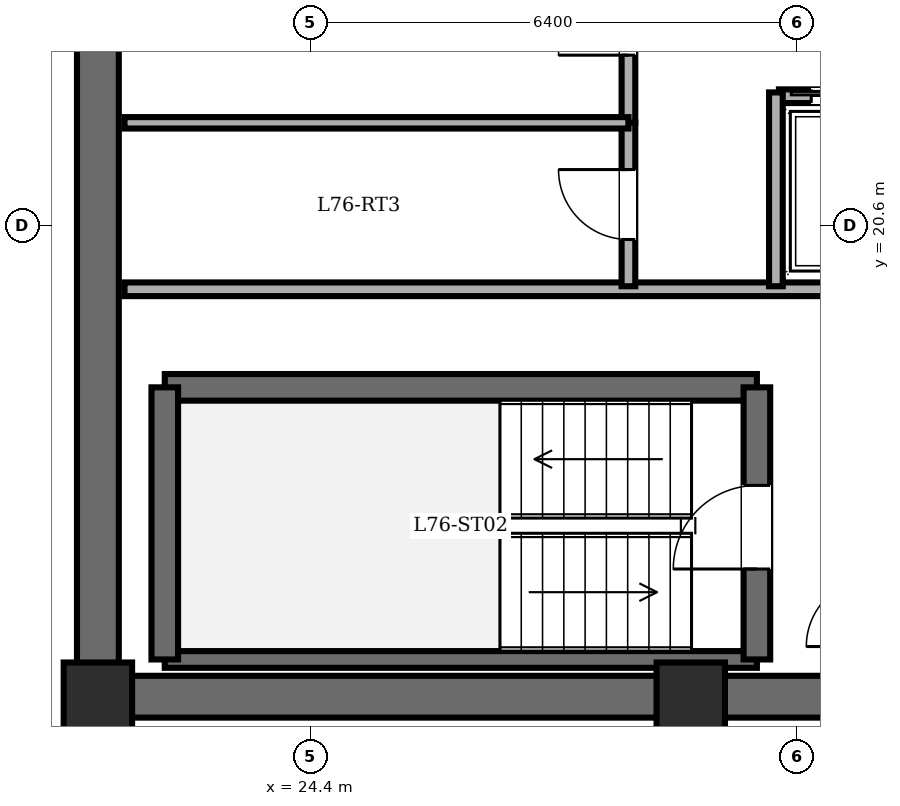
"""IFC4 building model, lengths in metres.
Left out: names, types, materials, properties, quantities, classifications, styles, units other than length and angle.
Written with IfcOpenShell. Run it as: python <this file> out.ifc"""

import sys

from ifc_helpers import new_model, si_unit, direction, frame, frame_2d, origin, origin_2d, place, context, subcontext, project, spatial, rectangle, extrude, element, fill, save


model = new_model("IFC4")
c1 = context("Model", 3, precision=1e-05, world=origin(), true_north=direction((0.0, 1.0)))
c2 = subcontext(c1, "Body", "Model", "MODEL_VIEW")
j1 = project(units=[si_unit("LENGTHUNIT", "METRE"), si_unit("PLANEANGLEUNIT", "RADIAN")], contexts=[c1])
p1 = place(None, origin())
s1 = spatial("IfcSite", under=j1, at=p1, CompositionType="ELEMENT")
p2 = place(p1, origin())
s2 = spatial("IfcBuilding", under=s1, at=p2, CompositionType="ELEMENT")
p3 = place(p2, frame((0.0, 0.0, 291.65)))
s3 = spatial("IfcBuildingStorey", under=s2, at=p3, CompositionType="ELEMENT", Elevation=291.65)
for number, where, z_axis, x_axis in (
    (1, (21.6, 14.4, 0.0), (0.0, 0.0, 1.0), (1.0, 0.0, 0.0)),
    (2, (29.4, 14.4, 0.0), (0.0, 0.0, 1.0), (1.0, 0.0, 0.0)),
):
    element("IfcColumn", number, at=place(p3, frame(where, z_axis=z_axis, x_axis=x_axis)), inside=s3, PredefinedType="COLUMN", context=c2, shape_type="SweptSolid", body=[
        extrude(rectangle(XDim=0.9, YDim=0.9, at=origin_2d()), origin(), (0.0, 0.0, 1.0), 3.65),
    ])
p4 = place(p3, frame((21.6, 14.4, 0.0), z_axis=(0.0, 0.0, 1.0), x_axis=(0.0, 1.0, 0.0)))
e3 = element("IfcWall", 3, at=p4, inside=s3, PredefinedType="SHEAR", context=c2, shape_type="SweptSolid", body=[
    extrude(rectangle(XDim=19.2, YDim=0.55, at=frame_2d((9.6, 0.0))), origin(), (0.0, 0.0, 1.0), 3.41),
])
p5 = place(p3, frame((37.2, 14.4, 0.0), z_axis=(0.0, 0.0, 1.0), x_axis=(-1.0, 0.0, 0.0)))
e4 = element("IfcWall", 4, at=p5, inside=s3, PredefinedType="SHEAR", context=c2, shape_type="SweptSolid", body=[
    extrude(rectangle(XDim=15.6, YDim=0.55, at=frame_2d((7.8, 0.0))), origin(), (0.0, 0.0, 1.0), 3.41),
])
p6 = place(p3, frame((22.48, 18.47, 0.0), z_axis=(0.0, 0.0, 1.0), x_axis=(1.0, 0.0, 0.0)))
e5 = element("IfcWall", 5, at=p6, inside=s3, PredefinedType="SOLIDWALL", context=c2, shape_type="SweptSolid", body=[
    extrude(rectangle(XDim=7.79, YDim=0.35, at=frame_2d((3.895, 0.0))), origin(), (0.0, 0.0, 1.0), 3.41),
])
p7 = place(p3, frame((22.48, 14.89, 0.0), z_axis=(0.0, 0.0, 1.0), x_axis=(1.0, 0.0, 0.0)))
e6 = element("IfcWall", 6, at=p7, inside=s3, PredefinedType="PARTITIONING", context=c2, shape_type="SweptSolid", body=[
    extrude(rectangle(XDim=7.79, YDim=0.22, at=frame_2d((3.895, 0.0))), origin(), (0.0, 0.0, 1.0), 3.41),
])
p8 = place(p3, frame((22.48, 14.89, 0.0), z_axis=(0.0, 0.0, 1.0), x_axis=(0.0, 1.0, 0.0)))
e7 = element("IfcWall", 7, at=p8, inside=s3, PredefinedType="SOLIDWALL", context=c2, shape_type="SweptSolid", body=[
    extrude(rectangle(XDim=3.58, YDim=0.35, at=frame_2d((1.79, 0.0))), origin(), (0.0, 0.0, 1.0), 3.41),
])
p9 = place(p3, frame((30.27, 14.89, 0.0), z_axis=(0.0, 0.0, 1.0), x_axis=(0.0, 1.0, 0.0)))
e8 = element("IfcWall", 8, at=p9, inside=s3, PredefinedType="SOLIDWALL", context=c2, shape_type="SweptSolid", body=[
    extrude(rectangle(XDim=3.58, YDim=0.35, at=frame_2d((1.79, 0.0))), origin(), (0.0, 0.0, 1.0), 3.41),
])
p10 = place(p9, frame((1.19, 0.0, 0.0)))
e9 = element("IfcOpeningElement", 9, at=p10, cuts=e8, PredefinedType="OPENING", context=c2, shape_type="SweptSolid", body=[
    extrude(rectangle(XDim=1.1, YDim=2.15, at=frame_2d((0.55, 1.075))), frame((0.0, 0.185, 0.0), z_axis=(0.0, -1.0, 0.0), x_axis=(1.0, 0.0, 0.0)), (0.0, 0.0, 1.0), 0.37),
])
p11 = place(p3, frame((21.95, 19.76, 0.0), z_axis=(0.0, 0.0, 1.0), x_axis=(1.0, 0.0, 0.0)))
e10 = element("IfcWall", 10, at=p11, inside=s3, PredefinedType="PARTITIONING", context=c2, shape_type="SweptSolid", body=[
    extrude(rectangle(XDim=14.87, YDim=0.18, at=frame_2d((7.435, 0.0))), origin(), (0.0, 0.0, 1.0), 3.41),
])
p12 = place(p3, frame((30.56, 22.3, 0.0), z_axis=(0.0, 0.0, 1.0), x_axis=(1.0, 0.0, 0.0)))
e11 = element("IfcWall", 11, at=p12, inside=s3, PredefinedType="PARTITIONING", context=c2, shape_type="SweptSolid", body=[
    extrude(rectangle(XDim=1.9, YDim=0.18, at=frame_2d((0.95, 0.0))), origin(), (0.0, 0.0, 1.0), 3.41),
])
p13 = place(p12, frame((0.425, 0.0, 0.0)))
e12 = element("IfcOpeningElement", 12, at=p13, cuts=e11, PredefinedType="OPENING", context=c2, shape_type="SweptSolid", body=[
    extrude(rectangle(XDim=1.05, YDim=2.2, at=frame_2d((0.525, 1.1))), frame((0.0, 0.1, 0.0), z_axis=(0.0, -1.0, 0.0), x_axis=(1.0, 0.0, 0.0)), (0.0, 0.0, 1.0), 0.2),
])
p14 = place(p3, frame((30.52, 19.8, 0.0), z_axis=(0.0, 0.0, 1.0), x_axis=(0.0, 1.0, 0.0)))
e13 = element("IfcWall", 13, at=p14, inside=s3, PredefinedType="PARTITIONING", context=c2, shape_type="SweptSolid", body=[
    extrude(rectangle(XDim=2.55, YDim=0.18, at=frame_2d((1.275, 0.0))), origin(), (0.0, 0.0, 1.0), 3.41),
])
p15 = place(p3, frame((28.58, 21.95, 0.0), z_axis=(0.0, 0.0, 1.0), x_axis=(0.0, 1.0, 0.0)))
e14 = element("IfcWall", 14, at=p15, inside=s3, PredefinedType="PARTITIONING", context=c2, shape_type="SweptSolid", body=[
    extrude(rectangle(XDim=2.7, YDim=0.18, at=frame_2d((1.35, 0.0))), origin(), (0.0, 0.0, 1.0), 3.41),
])
p16 = place(p15, frame((0.89, 0.0, 0.0)))
e15 = element("IfcOpeningElement", 15, at=p16, cuts=e14, PredefinedType="OPENING", context=c2, shape_type="SweptSolid", body=[
    extrude(rectangle(XDim=0.92, YDim=2.1, at=frame_2d((0.46, 1.05))), frame((0.0, 0.1, 0.0), z_axis=(0.0, -1.0, 0.0), x_axis=(1.0, 0.0, 0.0)), (0.0, 0.0, 1.0), 0.2),
])
p17 = place(p3, frame((28.58, 19.8, 0.0), z_axis=(0.0, 0.0, 1.0), x_axis=(0.0, 1.0, 0.0)))
e16 = element("IfcWall", 16, at=p17, inside=s3, PredefinedType="PARTITIONING", context=c2, shape_type="SweptSolid", body=[
    extrude(rectangle(XDim=2.15, YDim=0.18, at=frame_2d((1.075, 0.0))), origin(), (0.0, 0.0, 1.0), 3.41),
])
p18 = place(p17, frame((0.615, 0.0, 0.0)))
e17 = element("IfcOpeningElement", 17, at=p18, cuts=e16, PredefinedType="OPENING", context=c2, shape_type="SweptSolid", body=[
    extrude(rectangle(XDim=0.92, YDim=2.1, at=frame_2d((0.46, 1.05))), frame((0.0, 0.1, 0.0), z_axis=(0.0, -1.0, 0.0), x_axis=(1.0, 0.0, 0.0)), (0.0, 0.0, 1.0), 0.2),
])
p19 = place(p3, frame((21.95, 21.95, 0.0), z_axis=(0.0, 0.0, 1.0), x_axis=(1.0, 0.0, 0.0)))
e18 = element("IfcWall", 18, at=p19, inside=s3, PredefinedType="PARTITIONING", context=c2, shape_type="SweptSolid", body=[
    extrude(rectangle(XDim=6.63, YDim=0.15, at=frame_2d((3.315, 0.0))), origin(), (0.0, 0.0, 1.0), 3.41),
])
p20 = place(p10, origin())
e19 = element("IfcDoor", 19, at=p20, inside=s3, OperationType="SINGLE_SWING_LEFT", PredefinedType="DOOR", context=c2, shape_type="SweptSolid", body=[
    extrude(rectangle(XDim=1.1, YDim=2.15, at=frame_2d((0.55, 1.075))), frame((0.0, 0.025, 0.0), z_axis=(0.0, -1.0, 0.0), x_axis=(1.0, 0.0, 0.0)), (0.0, 0.0, 1.0), 0.05),
])
fill(e9, e19)
p21 = place(p13, origin())
e20 = element("IfcDoor", 20, at=p21, inside=s3, OperationType="DOUBLE_DOOR_SLIDING", PredefinedType="DOOR", context=c2, shape_type="SweptSolid", body=[
    extrude(rectangle(XDim=1.05, YDim=2.2, at=frame_2d((0.525, 1.1))), frame((0.0, 0.025, 0.0), z_axis=(0.0, -1.0, 0.0), x_axis=(1.0, 0.0, 0.0)), (0.0, 0.0, 1.0), 0.05),
])
fill(e12, e20)
p22 = place(p16, origin())
e21 = element("IfcDoor", 21, at=p22, inside=s3, OperationType="SINGLE_SWING_LEFT", PredefinedType="DOOR", context=c2, shape_type="SweptSolid", body=[
    extrude(rectangle(XDim=0.92, YDim=2.1, at=frame_2d((0.46, 1.05))), frame((0.0, 0.025, 0.0), z_axis=(0.0, -1.0, 0.0), x_axis=(1.0, 0.0, 0.0)), (0.0, 0.0, 1.0), 0.05),
])
fill(e15, e21)
p23 = place(p18, origin())
e22 = element("IfcDoor", 22, at=p23, inside=s3, OperationType="SINGLE_SWING_RIGHT", PredefinedType="DOOR", context=c2, shape_type="SweptSolid", body=[
    extrude(rectangle(XDim=0.92, YDim=2.1, at=frame_2d((0.46, 1.05))), frame((0.0, 0.025, 0.0), z_axis=(0.0, -1.0, 0.0), x_axis=(1.0, 0.0, 0.0)), (0.0, 0.0, 1.0), 0.05),
])
fill(e17, e22)
save(model, sys.argv[1])
